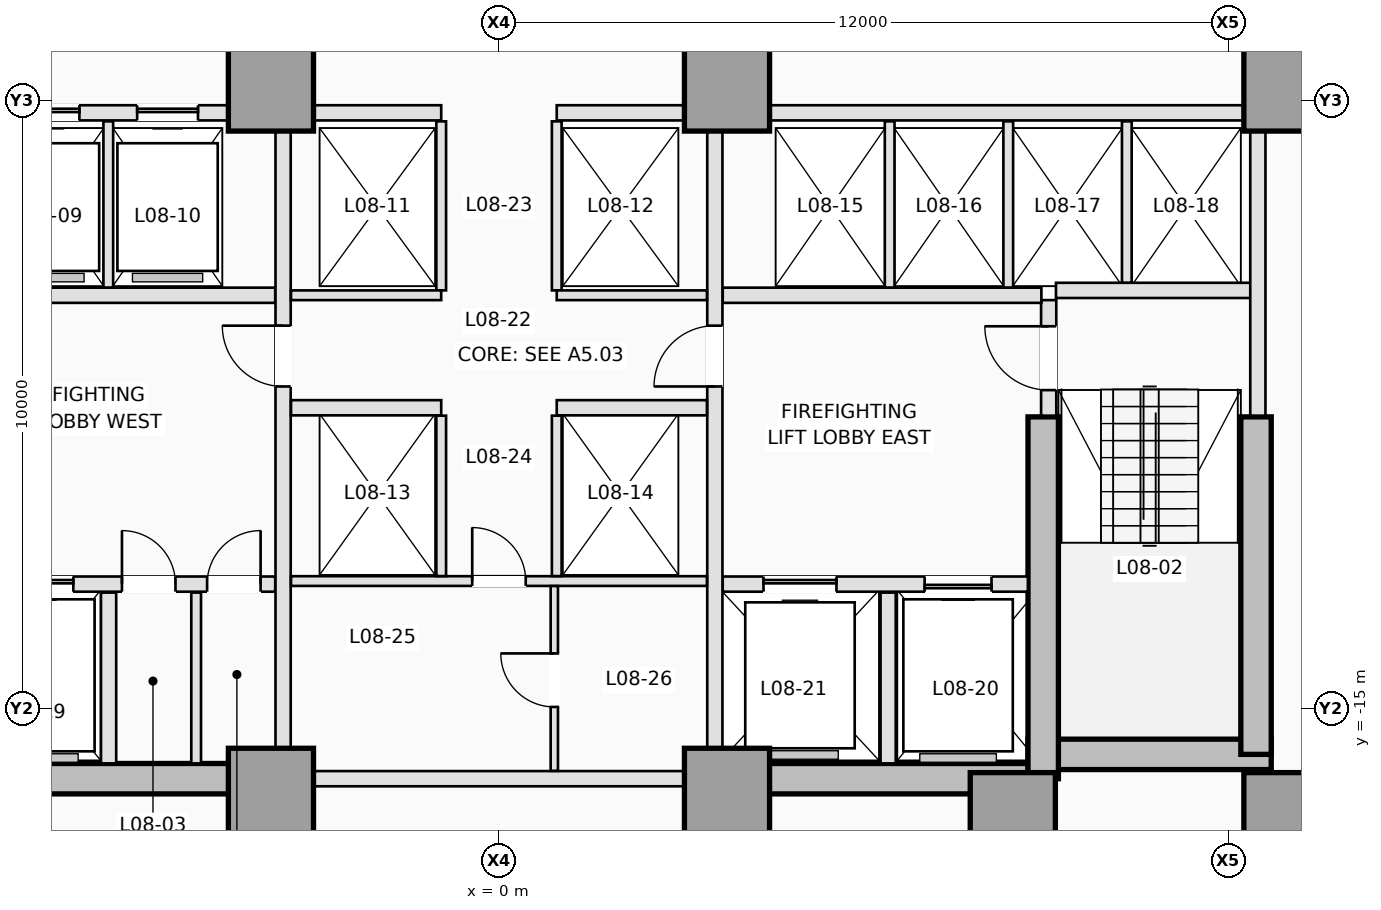
"""IFC4 building model, lengths in metres.
Left out: names, types, materials, properties, quantities, classifications, styles, units other than length and angle.
Written with IfcOpenShell. Run it as: python <this file> out.ifc"""

import sys

from ifc_helpers import new_model, si_unit, direction, frame, frame_2d, origin, origin_2d, place, context, subcontext, project, spatial, rectangle, extrude, element, fill, save


model = new_model("IFC4")
c1 = context("Model", 3, precision=1e-05, world=origin(), true_north=direction((0.0, 1.0)))
c2 = subcontext(c1, "Body", "Model", "MODEL_VIEW")
j1 = project(units=[si_unit("LENGTHUNIT", "METRE"), si_unit("PLANEANGLEUNIT", "RADIAN")], contexts=[c1])
p1 = place(None, origin())
s1 = spatial("IfcSite", under=j1, at=p1, CompositionType="ELEMENT")
p2 = place(p1, origin())
s2 = spatial("IfcBuilding", under=s1, at=p2, CompositionType="ELEMENT")
p3 = place(p2, frame((0.0, 0.0, 34.6)))
s3 = spatial("IfcBuildingStorey", under=s2, at=p3, CompositionType="ELEMENT", Elevation=34.6)
for number, where, z_axis, x_axis in (
    (1, (-8.95, -16.15, 0.0), (0.0, 0.0, 1.0), (1.0, 0.0, 0.0)),
    (2, (3.75, -16.15, 0.0), (0.0, 0.0, 1.0), (1.0, 0.0, 0.0)),
):
    element("IfcWall", number, at=place(p3, frame(where, z_axis=z_axis, x_axis=x_axis)), inside=s3, PredefinedType="SHEAR", context=c2, shape_type="SweptSolid", body=[
        extrude(rectangle(XDim=5.2, YDim=0.5, at=frame_2d((2.6, 0.0))), origin(), (0.0, 0.0, 1.0), 3.5),
    ])
p4 = place(p3, frame((8.7, -15.75, 0.0), z_axis=(0.0, 0.0, 1.0), x_axis=(1.0, 0.0, 0.0)))
e3 = element("IfcWall", 3, at=p4, inside=s3, PredefinedType="SHEAR", context=c2, shape_type="SweptSolid", body=[
    extrude(rectangle(XDim=4.0, YDim=0.5, at=frame_2d((2.0, 0.0))), origin(), (0.0, 0.0, 1.0), 3.5),
])
p5 = place(p3, frame((12.45, -15.75, 0.0), z_axis=(0.0, 0.0, 1.0), x_axis=(0.0, 1.0, 0.0)))
e4 = element("IfcWall", 4, at=p5, inside=s3, PredefinedType="SHEAR", context=c2, shape_type="SweptSolid", body=[
    extrude(rectangle(XDim=5.55, YDim=0.5, at=frame_2d((2.775, 0.0))), origin(), (0.0, 0.0, 1.0), 3.5),
])
p6 = place(p3, frame((8.95, -16.15, 0.0), z_axis=(0.0, 0.0, 1.0), x_axis=(0.0, 1.0, 0.0)))
e5 = element("IfcWall", 5, at=p6, inside=s3, PredefinedType="SHEAR", context=c2, shape_type="SweptSolid", body=[
    extrude(rectangle(XDim=5.95, YDim=0.5, at=frame_2d((2.975, 0.0))), origin(), (0.0, 0.0, 1.0), 3.5),
])
for number, where, z_axis, x_axis in (
    (6, (-3.75, -16.35, 0.0), (0.0, 0.0, 1.0), (1.0, 0.0, 0.0)),
    (7, (3.75, -16.35, 0.0), (0.0, 0.0, 1.0), (1.0, 0.0, 0.0)),
    (8, (8.45, -16.75, 0.0), (0.0, 0.0, 1.0), (1.0, 0.0, 0.0)),
    (9, (12.95, -16.75, 0.0), (0.0, 0.0, 1.0), (1.0, 0.0, 0.0)),
    (10, (-3.75, -4.8, 0.0), (0.0, 0.0, 1.0), (1.0, 0.0, 0.0)),
    (11, (3.75, -4.8, 0.0), (0.0, 0.0, 1.0), (1.0, 0.0, 0.0)),
    (12, (12.95, -4.8, 0.0), (0.0, 0.0, 1.0), (1.0, 0.0, 0.0)),
):
    element("IfcColumn", number, at=place(p3, frame(where, z_axis=z_axis, x_axis=x_axis)), inside=s3, PredefinedType="COLUMN", context=c2, shape_type="SweptSolid", body=[
        extrude(rectangle(XDim=1.4, YDim=1.4, at=origin_2d()), origin(), (0.0, 0.0, 1.0), 3.5),
    ])
p7 = place(p3, frame((9.04, -10.18, 0.0), z_axis=(0.0, 0.0, 1.0), x_axis=(0.0, 1.0, 0.0)))
e13 = element("IfcWall", 13, at=p7, inside=s3, PredefinedType="PARTITIONING", context=c2, shape_type="SweptSolid", body=[
    extrude(rectangle(XDim=1.9, YDim=0.25, at=frame_2d((0.95, 0.0))), origin(), (0.0, 0.0, 1.0), 3.25),
])
p8 = place(p7, frame((0.42, 0.0, 0.0)))
e14 = element("IfcOpeningElement", 14, at=p8, cuts=e13, PredefinedType="OPENING", context=c2, shape_type="SweptSolid", body=[
    extrude(rectangle(XDim=1.05, YDim=2.15, at=frame_2d((0.525, 1.075))), frame((0.0, 0.135, 0.0), z_axis=(0.0, -1.0, 0.0), x_axis=(1.0, 0.0, 0.0)), (0.0, 0.0, 1.0), 0.27),
])
p9 = place(p3, frame((9.16, -8.12, 0.0), z_axis=(0.0, 0.0, 1.0), x_axis=(1.0, 0.0, 0.0)))
e15 = element("IfcWall", 15, at=p9, inside=s3, PredefinedType="PARTITIONING", context=c2, shape_type="SweptSolid", body=[
    extrude(rectangle(XDim=3.22, YDim=0.25, at=frame_2d((1.61, 0.0))), origin(), (0.0, 0.0, 1.0), 3.25),
])
p10 = place(p3, frame((12.48, -10.18, 0.0), z_axis=(0.0, 0.0, 1.0), x_axis=(0.0, 1.0, 0.0)))
e16 = element("IfcWall", 16, at=p10, inside=s3, PredefinedType="PARTITIONING", context=c2, shape_type="SweptSolid", body=[
    extrude(rectangle(XDim=4.678, YDim=0.25, at=frame_2d((2.339, 0.0))), origin(), (0.0, 0.0, 1.0), 3.25),
])
p11 = place(p3, frame((-8.698, -12.95, 0.0), z_axis=(0.0, 0.0, 1.0), x_axis=(1.0, 0.0, 0.0)))
e17 = element("IfcWall", 17, at=p11, inside=s3, PredefinedType="PARTITIONING", context=c2, shape_type="SweptSolid", body=[
    extrude(rectangle(XDim=5.018, YDim=0.25, at=frame_2d((2.509, 0.0))), origin(), (0.0, 0.0, 1.0), 3.25),
])
p12 = place(p11, frame((0.598, 0.0, 0.0)))
e18 = element("IfcOpeningElement", 18, at=p12, cuts=e17, PredefinedType="OPENING", context=c2, shape_type="SweptSolid", body=[
    extrude(rectangle(XDim=1.1, YDim=2.15, at=frame_2d((0.55, 1.075))), frame((0.0, 0.135, 0.0), z_axis=(0.0, -1.0, 0.0), x_axis=(1.0, 0.0, 0.0)), (0.0, 0.0, 1.0), 0.27),
])
p13 = place(p11, frame((2.498, 0.0, 0.0)))
e19 = element("IfcOpeningElement", 19, at=p13, cuts=e17, PredefinedType="OPENING", context=c2, shape_type="SweptSolid", body=[
    extrude(rectangle(XDim=0.88, YDim=2.1, at=frame_2d((0.44, 1.05))), frame((0.0, 0.135, 0.0), z_axis=(0.0, -1.0, 0.0), x_axis=(1.0, 0.0, 0.0)), (0.0, 0.0, 1.0), 0.27),
])
p14 = place(p11, frame((3.898, 0.0, 0.0)))
e20 = element("IfcOpeningElement", 20, at=p14, cuts=e17, PredefinedType="OPENING", context=c2, shape_type="SweptSolid", body=[
    extrude(rectangle(XDim=0.88, YDim=2.1, at=frame_2d((0.44, 1.05))), frame((0.0, 0.135, 0.0), z_axis=(0.0, -1.0, 0.0), x_axis=(1.0, 0.0, 0.0)), (0.0, 0.0, 1.0), 0.27),
])
p15 = place(p3, frame((3.68, -12.95, 0.0), z_axis=(0.0, 0.0, 1.0), x_axis=(1.0, 0.0, 0.0)))
e21 = element("IfcWall", 21, at=p15, inside=s3, PredefinedType="PARTITIONING", context=c2, shape_type="SweptSolid", body=[
    extrude(rectangle(XDim=5.018, YDim=0.25, at=frame_2d((2.509, 0.0))), origin(), (0.0, 0.0, 1.0), 3.25),
])
p16 = place(p15, frame((3.32, 0.0, 0.0)))
e22 = element("IfcOpeningElement", 22, at=p16, cuts=e21, PredefinedType="OPENING", context=c2, shape_type="SweptSolid", body=[
    extrude(rectangle(XDim=1.1, YDim=2.15, at=frame_2d((0.55, 1.075))), frame((0.0, 0.135, 0.0), z_axis=(0.0, -1.0, 0.0), x_axis=(1.0, 0.0, 0.0)), (0.0, 0.0, 1.0), 0.27),
])
p17 = place(p15, frame((0.67, 0.0, 0.0)))
e23 = element("IfcOpeningElement", 23, at=p17, cuts=e21, PredefinedType="OPENING", context=c2, shape_type="SweptSolid", body=[
    extrude(rectangle(XDim=1.2, YDim=2.15, at=frame_2d((0.6, 1.075))), frame((0.0, 0.135, 0.0), z_axis=(0.0, -1.0, 0.0), x_axis=(1.0, 0.0, 0.0)), (0.0, 0.0, 1.0), 0.27),
])
p18 = place(p3, frame((-6.42, -15.898, 0.0), z_axis=(0.0, 0.0, 1.0), x_axis=(0.0, 1.0, 0.0)))
e24 = element("IfcWall", 24, at=p18, inside=s3, PredefinedType="PARTITIONING", context=c2, shape_type="SweptSolid", body=[
    extrude(rectangle(XDim=2.808, YDim=0.25, at=frame_2d((1.404, 0.0))), origin(), (0.0, 0.0, 1.0), 3.25),
])
p19 = place(p3, frame((-4.98, -15.898, 0.0), z_axis=(0.0, 0.0, 1.0), x_axis=(0.0, 1.0, 0.0)))
e25 = element("IfcWall", 25, at=p19, inside=s3, PredefinedType="PARTITIONING", context=c2, shape_type="SweptSolid", body=[
    extrude(rectangle(XDim=2.808, YDim=0.16, at=frame_2d((1.404, 0.0))), origin(), (0.0, 0.0, 1.0), 3.25),
])
p20 = place(p3, frame((6.4, -15.898, 0.0), z_axis=(0.0, 0.0, 1.0), x_axis=(0.0, 1.0, 0.0)))
e26 = element("IfcWall", 26, at=p20, inside=s3, PredefinedType="PARTITIONING", context=c2, shape_type="SweptSolid", body=[
    extrude(rectangle(XDim=2.808, YDim=0.25, at=frame_2d((1.404, 0.0))), origin(), (0.0, 0.0, 1.0), 3.25),
])
for number, where, z_axis, x_axis in (
    (27, (-8.92, -8.2, 0.0), (0.0, 0.0, 1.0), (1.0, 0.0, 0.0)),
    (28, (3.68, -8.2, 0.0), (0.0, 0.0, 1.0), (1.0, 0.0, 0.0)),
):
    element("IfcWall", number, at=place(p3, frame(where, z_axis=z_axis, x_axis=x_axis)), inside=s3, PredefinedType="PARTITIONING", context=c2, shape_type="SweptSolid", body=[
        extrude(rectangle(XDim=5.24, YDim=0.25, at=frame_2d((2.62, 0.0))), origin(), (0.0, 0.0, 1.0), 3.25),
    ])
p21 = place(p3, frame((-3.55, -15.648, 0.0), z_axis=(0.0, 0.0, 1.0), x_axis=(0.0, 1.0, 0.0)))
e29 = element("IfcWall", 29, at=p21, inside=s3, PredefinedType="PARTITIONING", context=c2, shape_type="SweptSolid", body=[
    extrude(rectangle(XDim=10.146, YDim=0.25, at=frame_2d((5.073, 0.0))), origin(), (0.0, 0.0, 1.0), 3.25),
])
p22 = place(p21, frame((5.948, 0.0, 0.0)))
e30 = element("IfcOpeningElement", 30, at=p22, cuts=e29, PredefinedType="OPENING", context=c2, shape_type="SweptSolid", body=[
    extrude(rectangle(XDim=1.0, YDim=2.15, at=frame_2d((0.5, 1.075))), frame((0.0, 0.135, 0.0), z_axis=(0.0, -1.0, 0.0), x_axis=(1.0, 0.0, 0.0)), (0.0, 0.0, 1.0), 0.27),
])
p23 = place(p3, frame((3.55, -15.648, 0.0), z_axis=(0.0, 0.0, 1.0), x_axis=(0.0, 1.0, 0.0)))
e31 = element("IfcWall", 31, at=p23, inside=s3, PredefinedType="PARTITIONING", context=c2, shape_type="SweptSolid", body=[
    extrude(rectangle(XDim=10.146, YDim=0.25, at=frame_2d((5.073, 0.0))), origin(), (0.0, 0.0, 1.0), 3.25),
])
p24 = place(p23, frame((5.948, 0.0, 0.0)))
e32 = element("IfcOpeningElement", 32, at=p24, cuts=e31, PredefinedType="OPENING", context=c2, shape_type="SweptSolid", body=[
    extrude(rectangle(XDim=1.0, YDim=2.15, at=frame_2d((0.5, 1.075))), frame((0.0, 0.135, 0.0), z_axis=(0.0, -1.0, 0.0), x_axis=(1.0, 0.0, 0.0)), (0.0, 0.0, 1.0), 0.27),
])
p25 = place(p3, frame((-12.248, -5.2, 0.0), z_axis=(0.0, 0.0, 1.0), x_axis=(1.0, 0.0, 0.0)))
e33 = element("IfcWall", 33, at=p25, inside=s3, PredefinedType="PARTITIONING", context=c2, shape_type="SweptSolid", body=[
    extrude(rectangle(XDim=7.796, YDim=0.25, at=frame_2d((3.898, 0.0))), origin(), (0.0, 0.0, 1.0), 3.25),
])
p26 = place(p25, frame((0.448, 0.0, 0.0)))
e34 = element("IfcOpeningElement", 34, at=p26, cuts=e33, PredefinedType="OPENING", context=c2, shape_type="SweptSolid", body=[
    extrude(rectangle(XDim=1.0, YDim=2.15, at=frame_2d((0.5, 1.075))), frame((0.0, 0.135, 0.0), z_axis=(0.0, -1.0, 0.0), x_axis=(1.0, 0.0, 0.0)), (0.0, 0.0, 1.0), 0.27),
])
p27 = place(p25, frame((2.398, 0.0, 0.0)))
e35 = element("IfcOpeningElement", 35, at=p27, cuts=e33, PredefinedType="OPENING", context=c2, shape_type="SweptSolid", body=[
    extrude(rectangle(XDim=1.0, YDim=2.15, at=frame_2d((0.5, 1.075))), frame((0.0, 0.135, 0.0), z_axis=(0.0, -1.0, 0.0), x_axis=(1.0, 0.0, 0.0)), (0.0, 0.0, 1.0), 0.27),
])
p28 = place(p25, frame((4.348, 0.0, 0.0)))
e36 = element("IfcOpeningElement", 36, at=p28, cuts=e33, PredefinedType="OPENING", context=c2, shape_type="SweptSolid", body=[
    extrude(rectangle(XDim=1.0, YDim=2.15, at=frame_2d((0.5, 1.075))), frame((0.0, 0.135, 0.0), z_axis=(0.0, -1.0, 0.0), x_axis=(1.0, 0.0, 0.0)), (0.0, 0.0, 1.0), 0.27),
])
p29 = place(p25, frame((6.298, 0.0, 0.0)))
e37 = element("IfcOpeningElement", 37, at=p29, cuts=e33, PredefinedType="OPENING", context=c2, shape_type="SweptSolid", body=[
    extrude(rectangle(XDim=1.0, YDim=2.15, at=frame_2d((0.5, 1.075))), frame((0.0, 0.135, 0.0), z_axis=(0.0, -1.0, 0.0), x_axis=(1.0, 0.0, 0.0)), (0.0, 0.0, 1.0), 0.27),
])
p30 = place(p3, frame((4.452, -5.2, 0.0), z_axis=(0.0, 0.0, 1.0), x_axis=(1.0, 0.0, 0.0)))
e38 = element("IfcWall", 38, at=p30, inside=s3, PredefinedType="PARTITIONING", context=c2, shape_type="SweptSolid", body=[
    extrude(rectangle(XDim=7.796, YDim=0.25, at=frame_2d((3.898, 0.0))), origin(), (0.0, 0.0, 1.0), 3.25),
])
for number, where, z_axis, x_axis in (
    (39, (-3.048, -5.2, 0.0), (0.0, 0.0, 1.0), (1.0, 0.0, 0.0)),
    (40, (0.95, -5.2, 0.0), (0.0, 0.0, 1.0), (1.0, 0.0, 0.0)),
):
    element("IfcWall", number, at=place(p3, frame(where, z_axis=z_axis, x_axis=x_axis)), inside=s3, PredefinedType="PARTITIONING", context=c2, shape_type="SweptSolid", body=[
        extrude(rectangle(XDim=2.098, YDim=0.25, at=frame_2d((1.049, 0.0))), origin(), (0.0, 0.0, 1.0), 3.25),
    ])
for number, where, z_axis, x_axis in (
    (41, (-6.425, -8.073, 0.0), (0.0, 0.0, 1.0), (0.0, 1.0, 0.0)),
    (42, (6.425, -8.073, 0.0), (0.0, 0.0, 1.0), (0.0, 1.0, 0.0)),
    (43, (8.375, -8.073, 0.0), (0.0, 0.0, 1.0), (0.0, 1.0, 0.0)),
):
    element("IfcWall", number, at=place(p3, frame(where, z_axis=z_axis, x_axis=x_axis)), inside=s3, PredefinedType="PARTITIONING", context=c2, shape_type="SweptSolid", body=[
        extrude(rectangle(XDim=2.733, YDim=0.16, at=frame_2d((1.366, 0.0))), origin(), (0.0, 0.0, 1.0), 3.25),
    ])
p31 = place(p3, frame((10.325, -7.993, 0.0), z_axis=(0.0, 0.0, 1.0), x_axis=(0.0, 1.0, 0.0)))
e44 = element("IfcWall", 44, at=p31, inside=s3, PredefinedType="PARTITIONING", context=c2, shape_type="SweptSolid", body=[
    extrude(rectangle(XDim=2.653, YDim=0.16, at=frame_2d((1.326, 0.0))), origin(), (0.0, 0.0, 1.0), 3.25),
])
p32 = place(p3, frame((-3.048, -16.15, 0.0), z_axis=(0.0, 0.0, 1.0), x_axis=(1.0, 0.0, 0.0)))
e45 = element("IfcWall", 45, at=p32, inside=s3, PredefinedType="PARTITIONING", context=c2, shape_type="SweptSolid", body=[
    extrude(rectangle(XDim=6.096, YDim=0.25, at=frame_2d((3.048, 0.0))), origin(), (0.0, 0.0, 1.0), 2.3),
])
for number, where, z_axis, x_axis in (
    (46, (-0.95, -8.12, 0.0), (0.0, 0.0, 1.0), (0.0, 1.0, 0.0)),
    (47, (0.95, -8.12, 0.0), (0.0, 0.0, 1.0), (0.0, 1.0, 0.0)),
):
    element("IfcWall", number, at=place(p3, frame(where, z_axis=z_axis, x_axis=x_axis)), inside=s3, PredefinedType="PARTITIONING", context=c2, shape_type="SweptSolid", body=[
        extrude(rectangle(XDim=2.78, YDim=0.16, at=frame_2d((1.39, 0.0))), origin(), (0.0, 0.0, 1.0), 3.25),
    ])
for number, where, z_axis, x_axis in (
    (48, (-3.42, -8.2, 0.0), (0.0, 0.0, 1.0), (1.0, 0.0, 0.0)),
    (49, (0.95, -8.2, 0.0), (0.0, 0.0, 1.0), (1.0, 0.0, 0.0)),
):
    element("IfcWall", number, at=place(p3, frame(where, z_axis=z_axis, x_axis=x_axis)), inside=s3, PredefinedType="PARTITIONING", context=c2, shape_type="SweptSolid", body=[
        extrude(rectangle(XDim=2.47, YDim=0.16, at=frame_2d((1.235, 0.0))), origin(), (0.0, 0.0, 1.0), 3.25),
    ])
for number, where, z_axis, x_axis in (
    (50, (-3.42, -10.05, 0.0), (0.0, 0.0, 1.0), (1.0, 0.0, 0.0)),
    (51, (0.95, -10.05, 0.0), (0.0, 0.0, 1.0), (1.0, 0.0, 0.0)),
):
    element("IfcWall", number, at=place(p3, frame(where, z_axis=z_axis, x_axis=x_axis)), inside=s3, PredefinedType="PARTITIONING", context=c2, shape_type="SweptSolid", body=[
        extrude(rectangle(XDim=2.47, YDim=0.25, at=frame_2d((1.235, 0.0))), origin(), (0.0, 0.0, 1.0), 3.25),
    ])
p33 = place(p3, frame((-3.42, -12.9, 0.0), z_axis=(0.0, 0.0, 1.0), x_axis=(1.0, 0.0, 0.0)))
e52 = element("IfcWall", 52, at=p33, inside=s3, PredefinedType="PARTITIONING", context=c2, shape_type="SweptSolid", body=[
    extrude(rectangle(XDim=6.84, YDim=0.16, at=frame_2d((3.42, 0.0))), origin(), (0.0, 0.0, 1.0), 3.25),
])
p34 = place(p33, frame((2.98, 0.0, 0.0)))
e53 = element("IfcOpeningElement", 53, at=p34, cuts=e52, PredefinedType="OPENING", context=c2, shape_type="SweptSolid", body=[
    extrude(rectangle(XDim=0.88, YDim=2.12, at=frame_2d((0.44, 1.06))), frame((0.0, 0.09, 0.0), z_axis=(0.0, -1.0, 0.0), x_axis=(1.0, 0.0, 0.0)), (0.0, 0.0, 1.0), 0.18),
])
for number, where, z_axis, x_axis in (
    (54, (-0.95, -12.818, 0.0), (0.0, 0.0, 1.0), (0.0, 1.0, 0.0)),
    (55, (0.95, -12.818, 0.0), (0.0, 0.0, 1.0), (0.0, 1.0, 0.0)),
):
    element("IfcWall", number, at=place(p3, frame(where, z_axis=z_axis, x_axis=x_axis)), inside=s3, PredefinedType="PARTITIONING", context=c2, shape_type="SweptSolid", body=[
        extrude(rectangle(XDim=2.638, YDim=0.16, at=frame_2d((1.319, 0.0))), origin(), (0.0, 0.0, 1.0), 3.25),
    ])
p35 = place(p3, frame((0.91, -16.02, 0.0), z_axis=(0.0, 0.0, 1.0), x_axis=(0.0, 1.0, 0.0)))
e56 = element("IfcWall", 56, at=p35, inside=s3, PredefinedType="PARTITIONING", context=c2, shape_type="SweptSolid", body=[
    extrude(rectangle(XDim=3.038, YDim=0.12, at=frame_2d((1.519, 0.0))), origin(), (0.0, 0.0, 1.0), 3.25),
])
p36 = place(p35, frame((1.05, 0.0, 0.0)))
e57 = element("IfcOpeningElement", 57, at=p36, cuts=e56, PredefinedType="OPENING", context=c2, shape_type="SweptSolid", body=[
    extrude(rectangle(XDim=0.88, YDim=2.12, at=frame_2d((0.44, 1.06))), frame((0.0, 0.07, 0.0), z_axis=(0.0, -1.0, 0.0), x_axis=(1.0, 0.0, 0.0)), (0.0, 0.0, 1.0), 0.14),
])
p37 = place(p28, origin())
e58 = element("IfcDoor", 58, at=p37, inside=s3, OperationType="SLIDING_TO_LEFT", PredefinedType="DOOR", context=c2, shape_type="SweptSolid", body=[
    extrude(rectangle(XDim=1.0, YDim=2.15, at=frame_2d((0.5, 1.075))), frame((0.0, 0.025, 0.0), z_axis=(0.0, -1.0, 0.0), x_axis=(1.0, 0.0, 0.0)), (0.0, 0.0, 1.0), 0.05),
])
fill(e36, e58)
p38 = place(p29, origin())
e59 = element("IfcDoor", 59, at=p38, inside=s3, OperationType="SLIDING_TO_LEFT", PredefinedType="DOOR", context=c2, shape_type="SweptSolid", body=[
    extrude(rectangle(XDim=1.0, YDim=2.15, at=frame_2d((0.5, 1.075))), frame((0.0, 0.025, 0.0), z_axis=(0.0, -1.0, 0.0), x_axis=(1.0, 0.0, 0.0)), (0.0, 0.0, 1.0), 0.05),
])
fill(e37, e59)
p39 = place(p12, origin())
e60 = element("IfcDoor", 60, at=p39, inside=s3, OperationType="SLIDING_TO_LEFT", PredefinedType="DOOR", context=c2, shape_type="SweptSolid", body=[
    extrude(rectangle(XDim=1.1, YDim=2.15, at=frame_2d((0.55, 1.075))), frame((0.0, 0.025, 0.0), z_axis=(0.0, -1.0, 0.0), x_axis=(1.0, 0.0, 0.0)), (0.0, 0.0, 1.0), 0.05),
])
fill(e18, e60)
p40 = place(p16, origin())
e61 = element("IfcDoor", 61, at=p40, inside=s3, OperationType="SLIDING_TO_RIGHT", PredefinedType="DOOR", context=c2, shape_type="SweptSolid", body=[
    extrude(rectangle(XDim=1.1, YDim=2.15, at=frame_2d((0.55, 1.075))), frame((0.0, 0.025, 0.0), z_axis=(0.0, -1.0, 0.0), x_axis=(1.0, 0.0, 0.0)), (0.0, 0.0, 1.0), 0.05),
])
fill(e22, e61)
p41 = place(p17, origin())
e62 = element("IfcDoor", 62, at=p41, inside=s3, OperationType="SLIDING_TO_LEFT", PredefinedType="DOOR", context=c2, shape_type="SweptSolid", body=[
    extrude(rectangle(XDim=1.2, YDim=2.15, at=frame_2d((0.6, 1.075))), frame((0.0, 0.025, 0.0), z_axis=(0.0, -1.0, 0.0), x_axis=(1.0, 0.0, 0.0)), (0.0, 0.0, 1.0), 0.05),
])
fill(e23, e62)
p42 = place(p8, origin())
e63 = element("IfcDoor", 63, at=p42, inside=s3, OperationType="SINGLE_SWING_RIGHT", PredefinedType="DOOR", context=c2, shape_type="SweptSolid", body=[
    extrude(rectangle(XDim=1.05, YDim=2.15, at=frame_2d((0.525, 1.075))), frame((0.0, 0.025, 0.0), z_axis=(0.0, -1.0, 0.0), x_axis=(1.0, 0.0, 0.0)), (0.0, 0.0, 1.0), 0.05),
])
fill(e14, e63)
p43 = place(p13, origin())
e64 = element("IfcDoor", 64, at=p43, inside=s3, OperationType="SINGLE_SWING_LEFT", PredefinedType="TRAPDOOR", context=c2, shape_type="SweptSolid", body=[
    extrude(rectangle(XDim=0.88, YDim=2.1, at=frame_2d((0.44, 1.05))), frame((0.0, 0.025, 0.0), z_axis=(0.0, -1.0, 0.0), x_axis=(1.0, 0.0, 0.0)), (0.0, 0.0, 1.0), 0.05),
])
fill(e19, e64)
p44 = place(p14, origin())
e65 = element("IfcDoor", 65, at=p44, inside=s3, OperationType="SINGLE_SWING_RIGHT", PredefinedType="TRAPDOOR", context=c2, shape_type="SweptSolid", body=[
    extrude(rectangle(XDim=0.88, YDim=2.1, at=frame_2d((0.44, 1.05))), frame((0.0, 0.025, 0.0), z_axis=(0.0, -1.0, 0.0), x_axis=(1.0, 0.0, 0.0)), (0.0, 0.0, 1.0), 0.05),
])
fill(e20, e65)
p45 = place(p22, origin())
e66 = element("IfcDoor", 66, at=p45, inside=s3, OperationType="SINGLE_SWING_RIGHT", PredefinedType="DOOR", context=c2, shape_type="SweptSolid", body=[
    extrude(rectangle(XDim=1.0, YDim=2.15, at=frame_2d((0.5, 1.075))), frame((0.0, 0.025, 0.0), z_axis=(0.0, -1.0, 0.0), x_axis=(1.0, 0.0, 0.0)), (0.0, 0.0, 1.0), 0.05),
])
fill(e30, e66)
p46 = place(p24, origin())
e67 = element("IfcDoor", 67, at=p46, inside=s3, OperationType="SINGLE_SWING_LEFT", PredefinedType="DOOR", context=c2, shape_type="SweptSolid", body=[
    extrude(rectangle(XDim=1.0, YDim=2.15, at=frame_2d((0.5, 1.075))), frame((0.0, 0.025, 0.0), z_axis=(0.0, -1.0, 0.0), x_axis=(1.0, 0.0, 0.0)), (0.0, 0.0, 1.0), 0.05),
])
fill(e32, e67)
p47 = place(p34, origin())
e68 = element("IfcDoor", 68, at=p47, inside=s3, OperationType="SINGLE_SWING_LEFT", PredefinedType="DOOR", context=c2, shape_type="SweptSolid", body=[
    extrude(rectangle(XDim=0.88, YDim=2.12, at=frame_2d((0.44, 1.06))), frame((0.0, 0.025, 0.0), z_axis=(0.0, -1.0, 0.0), x_axis=(1.0, 0.0, 0.0)), (0.0, 0.0, 1.0), 0.05),
])
fill(e53, e68)
p48 = place(p36, origin())
e69 = element("IfcDoor", 69, at=p48, inside=s3, OperationType="SINGLE_SWING_RIGHT", PredefinedType="DOOR", context=c2, shape_type="SweptSolid", body=[
    extrude(rectangle(XDim=0.88, YDim=2.12, at=frame_2d((0.44, 1.06))), frame((0.0, 0.025, 0.0), z_axis=(0.0, -1.0, 0.0), x_axis=(1.0, 0.0, 0.0)), (0.0, 0.0, 1.0), 0.05),
])
fill(e57, e69)
save(model, sys.argv[1])
